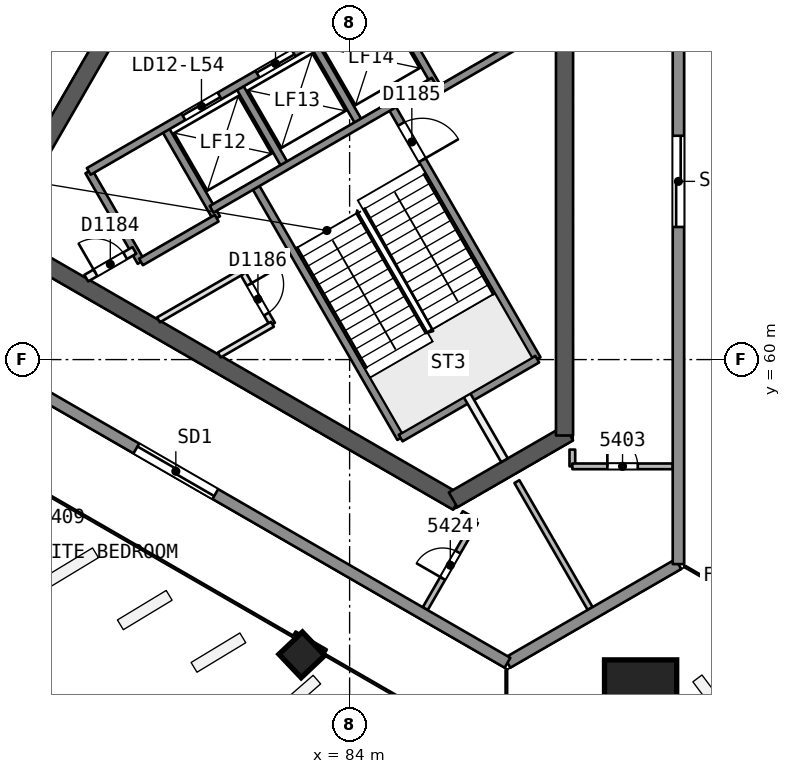
"""IFC4 building model, lengths in metres.
Left out: names, types, materials, properties, quantities, classifications, styles, units other than length and angle.
Written with IfcOpenShell. Run it as: python <this file> out.ifc"""

import sys

from ifc_helpers import new_model, si_unit, direction, frame, frame_2d, origin, origin_2d, place, context, subcontext, project, spatial, rectangle, extrude, element, fill, save


model = new_model("IFC4")
c1 = context("Model", 3, precision=1e-05, world=origin(), true_north=direction((0.0, 1.0)))
c2 = subcontext(c1, "Body", "Model", "MODEL_VIEW")
j1 = project(units=[si_unit("LENGTHUNIT", "METRE"), si_unit("PLANEANGLEUNIT", "RADIAN")], contexts=[c1])
p1 = place(None, origin())
s1 = spatial("IfcSite", under=j1, at=p1, CompositionType="ELEMENT")
p2 = place(p1, origin())
s2 = spatial("IfcBuilding", under=s1, at=p2, CompositionType="ELEMENT")
p3 = place(p2, frame((0.0, 0.0, 220.6)))
s3 = spatial("IfcBuildingStorey", under=s2, at=p3, CompositionType="ELEMENT", Elevation=220.6)
p4 = place(p3, frame((79.63, 71.981, 0.0), z_axis=(0.0, 0.0, 1.0), x_axis=(-0.500002171595, -0.86602415001, 0.0)))
e1 = element("IfcWall", 1, at=p4, inside=s3, PredefinedType="SHEAR", context=c2, shape_type="SweptSolid", body=[
    extrude(rectangle(XDim=10.25, YDim=0.45, at=frame_2d((5.125, 0.0))), origin(), (0.0, 0.0, 1.0), 3.7),
])
p5 = place(p4, frame((0.82, 0.0, 0.0)))
e2 = element("IfcOpeningElement", 2, at=p5, cuts=e1, PredefinedType="OPENING", context=c2, shape_type="SweptSolid", body=[
    extrude(rectangle(XDim=1.2, YDim=2.1, at=frame_2d((0.6, 1.05))), frame((0.0, 0.235, 0.0), z_axis=(0.0, -1.0, 0.0), x_axis=(1.0, 0.0, 0.0)), (0.0, 0.0, 1.0), 0.471),
])
p6 = place(p3, frame((74.617, 63.299, 0.0), z_axis=(0.0, 0.0, 1.0), x_axis=(0.86602594008, -0.499999071108, 0.0)))
e3 = element("IfcWall", 3, at=p6, inside=s3, PredefinedType="SHEAR", context=c2, shape_type="SweptSolid", body=[
    extrude(rectangle(XDim=14.108, YDim=0.45, at=frame_2d((7.054, 0.0))), origin(), (0.0, 0.0, 1.0), 3.7),
])
p7 = place(p3, frame((86.723, 56.31, 0.0), z_axis=(0.0, 0.0, 1.0), x_axis=(0.866042179588, 0.49997094233, 0.0)))
e4 = element("IfcWall", 4, at=p7, inside=s3, PredefinedType="SHEAR", context=c2, shape_type="SweptSolid", body=[
    extrude(rectangle(XDim=3.515, YDim=0.45, at=frame_2d((1.758, 0.0))), origin(), (0.0, 0.0, 1.0), 3.7),
])
p8 = place(p3, frame((89.655, 58.002, 0.0), z_axis=(0.0, 0.0, 1.0), x_axis=(0.0, 1.0, 0.0)))
e5 = element("IfcWall", 5, at=p8, inside=s3, PredefinedType="SHEAR", context=c2, shape_type="SweptSolid", body=[
    extrude(rectangle(XDim=14.204, YDim=0.45, at=frame_2d((7.102, 0.0))), origin(), (0.0, 0.0, 1.0), 3.7),
])
p9 = place(p3, frame((82.752, 52.197, 0.0), z_axis=(-0.00837646992, 0.028097450282, 0.999570091609), x_axis=(-0.499671890349, -0.865980240747, 0.02015501501)))
e6 = element("IfcColumn", 6, at=p9, inside=s3, PredefinedType="COLUMN", context=c2, shape_type="SweptSolid", body=[
    extrude(rectangle(XDim=0.85, YDim=0.85, at=origin_2d()), origin(), (0.0, 0.0, 1.0), 3.702),
])
p10 = place(p3, frame((91.678, 51.112, 0.0), z_axis=(-0.017607037296, 0.030466109479, 0.999380712447), x_axis=(-0.865809063816, -0.500374524745, 1.32655e-07)))
e7 = element("IfcColumn", 7, at=p10, inside=s3, PredefinedType="COLUMN", context=c2, shape_type="SweptSolid", body=[
    extrude(rectangle(XDim=1.9, YDim=1.9, at=origin_2d()), origin(), (0.0, 0.0, 1.0), 3.702),
])
p11 = place(p3, frame((89.861, 57.632, 0.0), z_axis=(0.0, 0.0, 1.0), x_axis=(0.0, -1.0, 0.0)))
e8 = element("IfcWall", 8, at=p11, inside=s3, PredefinedType="PARTITIONING", context=c2, shape_type="SweptSolid", body=[
    extrude(rectangle(XDim=0.441, YDim=0.15, at=frame_2d((0.22, 0.0))), origin(), (0.0, 0.0, 1.0), 3.3),
])
p12 = place(p3, frame((89.861, 57.191, 0.0), z_axis=(0.0, 0.0, 1.0), x_axis=(1.0, 0.0, 0.0)))
e9 = element("IfcWall", 9, at=p12, inside=s3, PredefinedType="PARTITIONING", context=c2, shape_type="SweptSolid", body=[
    extrude(rectangle(XDim=2.642, YDim=0.15, at=frame_2d((1.321, 0.0))), origin(), (0.0, 0.0, 1.0), 3.3),
])
p13 = place(p12, frame((0.921, 0.0, 0.0)))
e10 = element("IfcOpeningElement", 10, at=p13, cuts=e9, PredefinedType="OPENING", context=c2, shape_type="SweptSolid", body=[
    extrude(rectangle(XDim=0.8, YDim=2.1, at=frame_2d((0.4, 1.05))), frame((0.0, 0.085, 0.0), z_axis=(0.0, -1.0, 0.0), x_axis=(1.0, 0.0, 0.0)), (0.0, 0.0, 1.0), 0.171),
])
p14 = place(p3, frame((88.402, 56.789, 0.0), z_axis=(0.0, 0.0, 1.0), x_axis=(0.499980071345, -0.866036909293, 0.0)))
e11 = element("IfcWall", 11, at=p14, inside=s3, PredefinedType="PARTITIONING", context=c2, shape_type="SweptSolid", body=[
    extrude(rectangle(XDim=3.856, YDim=0.15, at=frame_2d((1.928, 0.0))), origin(), (0.0, 0.0, 1.0), 3.3),
])
p15 = place(p3, frame((85.989, 53.445, 0.0), z_axis=(0.0, 0.0, 1.0), x_axis=(0.50000507839, 0.866022471755, 0.0)))
e12 = element("IfcWall", 12, at=p15, inside=s3, PredefinedType="PARTITIONING", context=c2, shape_type="SweptSolid", body=[
    extrude(rectangle(XDim=2.642, YDim=0.15, at=frame_2d((1.321, 0.0))), origin(), (0.0, 0.0, 1.0), 3.3),
])
p16 = place(p15, frame((0.921, 0.0, 0.0)))
e13 = element("IfcOpeningElement", 13, at=p16, cuts=e12, PredefinedType="OPENING", context=c2, shape_type="SweptSolid", body=[
    extrude(rectangle(XDim=0.8, YDim=2.1, at=frame_2d((0.4, 1.05))), frame((0.0, 0.085, 0.0), z_axis=(0.0, -1.0, 0.0), x_axis=(1.0, 0.0, 0.0)), (0.0, 0.0, 1.0), 0.171),
])
p17 = place(p3, frame((87.31, 55.733, 0.0), z_axis=(0.0, 0.0, 1.0), x_axis=(-0.8659754619, 0.500086491905, 0.0)))
e14 = element("IfcWall", 14, at=p17, inside=s3, PredefinedType="PARTITIONING", context=c2, shape_type="SweptSolid", body=[
    extrude(rectangle(XDim=0.426, YDim=0.15, at=frame_2d((0.213, 0.0))), origin(), (0.0, 0.0, 1.0), 3.3),
])
p18 = place(p3, frame((92.652, 54.619, 0.0), z_axis=(0.0, 0.0, 1.0), x_axis=(-0.866044673852, -0.499966621779, 0.0)))
e15 = element("IfcWall", 15, at=p18, inside=s3, PredefinedType="SOLIDWALL", context=c2, shape_type="SweptSolid", body=[
    extrude(rectangle(XDim=5.193, YDim=0.3, at=frame_2d((2.597, 0.0))), origin(), (0.0, 0.0, 1.0), 3.3),
])
p19 = place(p3, frame((92.652, 105.381, 0.0), z_axis=(0.0, 0.0, 1.0), x_axis=(0.0, -1.0, 0.0)))
e16 = element("IfcWall", 16, at=p19, inside=s3, PredefinedType="SOLIDWALL", context=c2, shape_type="SweptSolid", body=[
    extrude(rectangle(XDim=50.762, YDim=0.3, at=frame_2d((25.381, 0.0))), origin(), (0.0, 0.0, 1.0), 3.3),
])
p20 = place(p19, frame((29.325, 0.0, 0.0)))
e17 = element("IfcOpeningElement", 17, at=p20, cuts=e16, PredefinedType="OPENING", context=c2, shape_type="SweptSolid", body=[
    extrude(rectangle(XDim=2.4, YDim=2.4, at=frame_2d((1.2, 1.2))), frame((0.0, 0.161, 0.0), z_axis=(0.0, -1.0, 0.0), x_axis=(1.0, 0.0, 0.0)), (0.0, 0.0, 1.0), 0.321),
])
p21 = place(p19, frame((39.492, 0.0, 0.0)))
e18 = element("IfcOpeningElement", 18, at=p21, cuts=e16, PredefinedType="OPENING", context=c2, shape_type="SweptSolid", body=[
    extrude(rectangle(XDim=2.4, YDim=2.4, at=frame_2d((1.2, 1.2))), frame((0.0, 0.161, 0.0), z_axis=(0.0, -1.0, 0.0), x_axis=(1.0, 0.0, 0.0)), (0.0, 0.0, 1.0), 0.321),
])
p22 = place(p19, frame((18.881, 0.0, 0.0)))
e19 = element("IfcOpeningElement", 19, at=p22, cuts=e16, PredefinedType="OPENING", context=c2, shape_type="SweptSolid", body=[
    extrude(rectangle(XDim=2.4, YDim=2.4, at=frame_2d((1.2, 1.2))), frame((0.0, 0.161, 0.0), z_axis=(0.0, -1.0, 0.0), x_axis=(1.0, 0.0, 0.0)), (0.0, 0.0, 1.0), 0.321),
])
p23 = place(p19, frame((8.878, 0.0, 0.0)))
e20 = element("IfcOpeningElement", 20, at=p23, cuts=e16, PredefinedType="OPENING", context=c2, shape_type="SweptSolid", body=[
    extrude(rectangle(XDim=2.4, YDim=2.4, at=frame_2d((1.2, 1.2))), frame((0.0, 0.161, 0.0), z_axis=(0.0, -1.0, 0.0), x_axis=(1.0, 0.0, 0.0)), (0.0, 0.0, 1.0), 0.321),
])
p24 = place(p19, frame((24.025, 0.0, 0.0)))
e21 = element("IfcOpeningElement", 21, at=p24, cuts=e16, PredefinedType="OPENING", context=c2, shape_type="SweptSolid", body=[
    extrude(rectangle(XDim=2.4, YDim=2.4, at=frame_2d((1.2, 1.2))), frame((0.0, 0.161, 0.0), z_axis=(0.0, -1.0, 0.0), x_axis=(1.0, 0.0, 0.0)), (0.0, 0.0, 1.0), 0.321),
])
p25 = place(p3, frame((88.155, 52.022, 0.0), z_axis=(0.0, 0.0, 1.0), x_axis=(-0.866024521231, 0.500001528624, 0.0)))
e22 = element("IfcWall", 22, at=p25, inside=s3, PredefinedType="SOLIDWALL", context=c2, shape_type="SweptSolid", body=[
    extrude(rectangle(XDim=50.762, YDim=0.3, at=frame_2d((25.381, 0.0))), origin(), (0.0, 0.0, 1.0), 3.3),
])
p26 = place(p25, frame((23.402, 0.0, 0.0)))
e23 = element("IfcOpeningElement", 23, at=p26, cuts=e22, PredefinedType="OPENING", context=c2, shape_type="SweptSolid", body=[
    extrude(rectangle(XDim=2.4, YDim=2.4, at=frame_2d((1.2, 1.2))), frame((0.0, 0.161, 0.0), z_axis=(0.0, -1.0, 0.0), x_axis=(1.0, 0.0, 0.0)), (0.0, 0.0, 1.0), 0.321),
])
p27 = place(p25, frame((29.013, 0.0, 0.0)))
e24 = element("IfcOpeningElement", 24, at=p27, cuts=e22, PredefinedType="OPENING", context=c2, shape_type="SweptSolid", body=[
    extrude(rectangle(XDim=2.4, YDim=2.4, at=frame_2d((1.2, 1.2))), frame((0.0, 0.161, 0.0), z_axis=(0.0, -1.0, 0.0), x_axis=(1.0, 0.0, 0.0)), (0.0, 0.0, 1.0), 0.321),
])
p28 = place(p25, frame((39.492, 0.0, 0.0)))
e25 = element("IfcOpeningElement", 25, at=p28, cuts=e22, PredefinedType="OPENING", context=c2, shape_type="SweptSolid", body=[
    extrude(rectangle(XDim=2.4, YDim=2.4, at=frame_2d((1.2, 1.2))), frame((0.0, 0.161, 0.0), z_axis=(0.0, -1.0, 0.0), x_axis=(1.0, 0.0, 0.0)), (0.0, 0.0, 1.0), 0.321),
])
p29 = place(p25, frame((18.569, 0.0, 0.0)))
e26 = element("IfcOpeningElement", 26, at=p29, cuts=e22, PredefinedType="OPENING", context=c2, shape_type="SweptSolid", body=[
    extrude(rectangle(XDim=2.4, YDim=2.4, at=frame_2d((1.2, 1.2))), frame((0.0, 0.161, 0.0), z_axis=(0.0, -1.0, 0.0), x_axis=(1.0, 0.0, 0.0)), (0.0, 0.0, 1.0), 0.321),
])
p30 = place(p25, frame((8.878, 0.0, 0.0)))
e27 = element("IfcOpeningElement", 27, at=p30, cuts=e22, PredefinedType="OPENING", context=c2, shape_type="SweptSolid", body=[
    extrude(rectangle(XDim=2.4, YDim=2.4, at=frame_2d((1.2, 1.2))), frame((0.0, 0.161, 0.0), z_axis=(0.0, -1.0, 0.0), x_axis=(1.0, 0.0, 0.0)), (0.0, 0.0, 1.0), 0.321),
])
p31 = place(p3, frame((77.135, 64.952, 0.0), z_axis=(0.0, 0.0, 1.0), x_axis=(0.499996545922, -0.866027397988, 0.0)))
e28 = element("IfcWall", 28, at=p31, inside=s3, PredefinedType="SOLIDWALL", context=c2, shape_type="SweptSolid", body=[
    extrude(rectangle(XDim=2.75, YDim=0.2, at=frame_2d((1.375, 0.0))), origin(), (0.0, 0.0, 1.0), 3.3),
])
p32 = place(p3, frame((81.169, 62.315, 0.0), z_axis=(0.0, 0.0, 1.0), x_axis=(0.499995408039, -0.866028054938, 0.0)))
e29 = element("IfcWall", 29, at=p32, inside=s3, PredefinedType="PARTITIONING", context=c2, shape_type="SweptSolid", body=[
    extrude(rectangle(XDim=1.6, YDim=0.15, at=frame_2d((0.8, 0.0))), origin(), (0.0, 0.0, 1.0), 3.3),
])
p33 = place(p32, frame((0.387, 0.0, 0.0)))
e30 = element("IfcOpeningElement", 30, at=p33, cuts=e29, PredefinedType="OPENING", context=c2, shape_type="SweptSolid", body=[
    extrude(rectangle(XDim=0.9, YDim=2.1, at=frame_2d((0.45, 1.05))), frame((0.0, 0.085, 0.0), z_axis=(0.0, -1.0, 0.0), x_axis=(1.0, 0.0, 0.0)), (0.0, 0.0, 1.0), 0.171),
])
p34 = place(p3, frame((79.127, 66.102, 0.0), z_axis=(0.0, 0.0, 1.0), x_axis=(0.499996545922, -0.866027397988, 0.0)))
e31 = element("IfcWall", 31, at=p34, inside=s3, PredefinedType="SOLIDWALL", context=c2, shape_type="SweptSolid", body=[
    extrude(rectangle(XDim=2.75, YDim=0.2, at=frame_2d((1.375, 0.0))), origin(), (0.0, 0.0, 1.0), 3.3),
])
p35 = place(p3, frame((81.493, 64.604, 0.0), z_axis=(0.0, 0.0, 1.0), x_axis=(0.500006057782, -0.866021906294, 0.0)))
e32 = element("IfcWall", 32, at=p35, inside=s3, PredefinedType="SOLIDWALL", context=c2, shape_type="SweptSolid", body=[
    extrude(rectangle(XDim=7.7, YDim=0.2, at=frame_2d((3.85, 0.0))), origin(), (0.0, 0.0, 1.0), 3.3),
])
p36 = place(p3, frame((81.076, 67.227, 0.0), z_axis=(0.0, 0.0, 1.0), x_axis=(0.50000366821, -0.866023285932, 0.0)))
e33 = element("IfcWall", 33, at=p36, inside=s3, PredefinedType="SOLIDWALL", context=c2, shape_type="SweptSolid", body=[
    extrude(rectangle(XDim=2.48, YDim=0.2, at=frame_2d((1.24, 0.0))), origin(), (0.0, 0.0, 1.0), 3.3),
])
p37 = place(p3, frame((87.09, 59.06, 0.0), z_axis=(0.0, 0.0, 1.0), x_axis=(0.500011643316, -0.866018681408, 0.0)))
e34 = element("IfcWall", 34, at=p37, inside=s3, PredefinedType="PARTITIONING", context=c2, shape_type="SweptSolid", body=[
    extrude(rectangle(XDim=1.973, YDim=0.2, at=frame_2d((0.987, 0.0))), origin(), (0.0, 0.0, 1.0), 3.3),
])
p38 = place(p3, frame((83.024, 68.352, 0.0), z_axis=(0.0, 0.0, 1.0), x_axis=(0.50000366821, -0.866023285932, 0.0)))
e35 = element("IfcWall", 35, at=p38, inside=s3, PredefinedType="SOLIDWALL", context=c2, shape_type="SweptSolid", body=[
    extrude(rectangle(XDim=2.48, YDim=0.2, at=frame_2d((1.24, 0.0))), origin(), (0.0, 0.0, 1.0), 3.3),
])
p39 = place(p3, frame((85.087, 66.679, 0.0), z_axis=(0.0, 0.0, 1.0), x_axis=(0.500019787375, -0.866013979237, 0.0)))
e36 = element("IfcWall", 36, at=p39, inside=s3, PredefinedType="SOLIDWALL", context=c2, shape_type="SweptSolid", body=[
    extrude(rectangle(XDim=7.7, YDim=0.2, at=frame_2d((3.85, 0.0))), origin(), (0.0, 0.0, 1.0), 3.3),
])
p40 = place(p39, frame((0.55, 0.0, 0.0)))
e37 = element("IfcOpeningElement", 37, at=p40, cuts=e36, PredefinedType="OPENING", context=c2, shape_type="SweptSolid", body=[
    extrude(rectangle(XDim=1.1, YDim=2.1, at=frame_2d((0.55, 1.05))), frame((0.0, 0.11, 0.0), z_axis=(0.0, -1.0, 0.0), x_axis=(1.0, 0.0, 0.0)), (0.0, 0.0, 1.0), 0.221),
])
p41 = place(p3, frame((84.973, 69.477, 0.0), z_axis=(0.0, 0.0, 1.0), x_axis=(0.499996545922, -0.866027397988, 0.0)))
e38 = element("IfcWall", 38, at=p41, inside=s3, PredefinedType="SOLIDWALL", context=c2, shape_type="SweptSolid", body=[
    extrude(rectangle(XDim=2.75, YDim=0.2, at=frame_2d((1.375, 0.0))), origin(), (0.0, 0.0, 1.0), 3.3),
])
p42 = place(p3, frame((77.135, 64.952, 0.0), z_axis=(0.0, 0.0, 1.0), x_axis=(0.866031916153, 0.499988720078, 0.0)))
e39 = element("IfcWall", 39, at=p42, inside=s3, PredefinedType="SOLIDWALL", context=c2, shape_type="SweptSolid", body=[
    extrude(rectangle(XDim=11.35, YDim=0.2, at=frame_2d((5.675, 0.0))), origin(), (0.0, 0.0, 1.0), 3.3),
])
p43 = place(p42, frame((2.875, 0.0, 0.0)))
e40 = element("IfcOpeningElement", 40, at=p43, cuts=e39, PredefinedType="OPENING", context=c2, shape_type="SweptSolid", body=[
    extrude(rectangle(XDim=1.1, YDim=2.1, at=frame_2d((0.55, 1.05))), frame((0.0, 0.11, 0.0), z_axis=(0.0, -1.0, 0.0), x_axis=(1.0, 0.0, 0.0)), (0.0, 0.0, 1.0), 0.221),
])
p44 = place(p42, frame((5.125, 0.0, 0.0)))
e41 = element("IfcOpeningElement", 41, at=p44, cuts=e39, PredefinedType="OPENING", context=c2, shape_type="SweptSolid", body=[
    extrude(rectangle(XDim=1.1, YDim=2.1, at=frame_2d((0.55, 1.05))), frame((0.0, 0.11, 0.0), z_axis=(0.0, -1.0, 0.0), x_axis=(1.0, 0.0, 0.0)), (0.0, 0.0, 1.0), 0.221),
])
p45 = place(p42, frame((7.375, 0.0, 0.0)))
e42 = element("IfcOpeningElement", 42, at=p45, cuts=e39, PredefinedType="OPENING", context=c2, shape_type="SweptSolid", body=[
    extrude(rectangle(XDim=1.1, YDim=2.1, at=frame_2d((0.55, 1.05))), frame((0.0, 0.11, 0.0), z_axis=(0.0, -1.0, 0.0), x_axis=(1.0, 0.0, 0.0)), (0.0, 0.0, 1.0), 0.221),
])
p46 = place(p3, frame((77.07, 62.143, 0.0), z_axis=(0.0, 0.0, 1.0), x_axis=(0.866013036001, 0.500021421018, 0.0)))
e43 = element("IfcWall", 43, at=p46, inside=s3, PredefinedType="PARTITIONING", context=c2, shape_type="SweptSolid", body=[
    extrude(rectangle(XDim=1.461, YDim=0.2, at=frame_2d((0.73, 0.0))), origin(), (0.0, 0.0, 1.0), 3.3),
])
p47 = place(p46, frame((0.281, 0.0, 0.0)))
e44 = element("IfcOpeningElement", 44, at=p47, cuts=e43, PredefinedType="OPENING", context=c2, shape_type="SweptSolid", body=[
    extrude(rectangle(XDim=0.9, YDim=2.1, at=frame_2d((0.45, 1.05))), frame((0.0, 0.11, 0.0), z_axis=(0.0, -1.0, 0.0), x_axis=(1.0, 0.0, 0.0)), (0.0, 0.0, 1.0), 0.221),
])
p48 = place(p3, frame((80.367, 63.954, 0.0), z_axis=(0.0, 0.0, 1.0), x_axis=(0.866026575979, 0.499997969693, 0.0)))
e45 = element("IfcWall", 45, at=p48, inside=s3, PredefinedType="SOLIDWALL", context=c2, shape_type="SweptSolid", body=[
    extrude(rectangle(XDim=6.75, YDim=0.2, at=frame_2d((3.375, 0.0))), origin(), (0.0, 0.0, 1.0), 3.3),
])
p49 = place(p3, frame((78.51, 62.57, 0.0), z_axis=(0.0, 0.0, 1.0), x_axis=(0.866053019151, 0.499952165731, 0.0)))
e46 = element("IfcWall", 46, at=p49, inside=s3, PredefinedType="SOLIDWALL", context=c2, shape_type="SweptSolid", body=[
    extrude(rectangle(XDim=2.3, YDim=0.2, at=frame_2d((1.15, 0.0))), origin(), (0.0, 0.0, 1.0), 3.3),
])
p50 = place(p3, frame((86.348, 67.095, 0.0), z_axis=(0.0, 0.0, 1.0), x_axis=(0.86602648383, 0.499998129301, 0.0)))
e47 = element("IfcWall", 47, at=p50, inside=s3, PredefinedType="SOLIDWALL", context=c2, shape_type="SweptSolid", body=[
    extrude(rectangle(XDim=2.3, YDim=0.2, at=frame_2d((1.15, 0.0))), origin(), (0.0, 0.0, 1.0), 3.3),
])
p51 = place(p3, frame((78.97, 61.046, 0.0), z_axis=(0.0, 0.0, 1.0), x_axis=(0.866033475577, 0.499986018985, 0.0)))
e48 = element("IfcWall", 48, at=p51, inside=s3, PredefinedType="PARTITIONING", context=c2, shape_type="SweptSolid", body=[
    extrude(rectangle(XDim=2.539, YDim=0.15, at=frame_2d((1.27, 0.0))), origin(), (0.0, 0.0, 1.0), 3.3),
])
p52 = place(p3, frame((80.57, 60.122, 0.0), z_axis=(0.0, 0.0, 1.0), x_axis=(0.866039608017, 0.49997539674, 0.0)))
e49 = element("IfcWall", 49, at=p52, inside=s3, PredefinedType="PARTITIONING", context=c2, shape_type="SweptSolid", body=[
    extrude(rectangle(XDim=1.615, YDim=0.15, at=frame_2d((0.808, 0.0))), origin(), (0.0, 0.0, 1.0), 3.3),
])
p53 = place(p3, frame((85.343, 57.935, 0.0), z_axis=(0.0, 0.0, 1.0), x_axis=(0.866004344652, 0.500036473714, 0.0)))
e50 = element("IfcWall", 50, at=p53, inside=s3, PredefinedType="SOLIDWALL", context=c2, shape_type="SweptSolid", body=[
    extrude(rectangle(XDim=4.15, YDim=0.2, at=frame_2d((2.075, 0.0))), origin(), (0.0, 0.0, 1.0), 3.3),
])
p54 = place(p13, origin())
e51 = element("IfcDoor", 51, at=p54, inside=s3, OperationType="SINGLE_SWING_LEFT", PredefinedType="NOTDEFINED", context=c2, shape_type="SweptSolid", body=[
    extrude(rectangle(XDim=0.8, YDim=2.1, at=frame_2d((0.4, 1.05))), frame((0.0, 0.025, 0.0), z_axis=(0.0, -1.0, 0.0), x_axis=(1.0, 0.0, 0.0)), (0.0, 0.0, 1.0), 0.05),
])
fill(e10, e51)
p55 = place(p16, origin())
e52 = element("IfcDoor", 52, at=p55, inside=s3, OperationType="SINGLE_SWING_LEFT", PredefinedType="NOTDEFINED", context=c2, shape_type="SweptSolid", body=[
    extrude(rectangle(XDim=0.8, YDim=2.1, at=frame_2d((0.4, 1.05))), frame((0.0, 0.025, 0.0), z_axis=(0.0, -1.0, 0.0), x_axis=(1.0, 0.0, 0.0)), (0.0, 0.0, 1.0), 0.05),
])
fill(e13, e52)
p56 = place(p21, origin())
e53 = element("IfcDoor", 53, at=p56, inside=s3, OperationType="SLIDING_TO_RIGHT", PredefinedType="NOTDEFINED", context=c2, shape_type="SweptSolid", body=[
    extrude(rectangle(XDim=2.4, YDim=2.4, at=frame_2d((1.2, 1.2))), frame((0.0, 0.025, 0.0), z_axis=(0.0, -1.0, 0.0), x_axis=(1.0, 0.0, 0.0)), (0.0, 0.0, 1.0), 0.05),
])
fill(e18, e53)
p57 = place(p30, origin())
e54 = element("IfcDoor", 54, at=p57, inside=s3, OperationType="SLIDING_TO_LEFT", PredefinedType="NOTDEFINED", context=c2, shape_type="SweptSolid", body=[
    extrude(rectangle(XDim=2.4, YDim=2.4, at=frame_2d((1.2, 1.2))), frame((0.0, 0.025, 0.0), z_axis=(0.0, -1.0, 0.0), x_axis=(1.0, 0.0, 0.0)), (0.0, 0.0, 1.0), 0.05),
])
fill(e27, e54)
p58 = place(p43, origin())
e55 = element("IfcDoor", 55, at=p58, inside=s3, OperationType="SLIDING_TO_LEFT", PredefinedType="NOTDEFINED", context=c2, shape_type="SweptSolid", body=[
    extrude(rectangle(XDim=1.1, YDim=2.1, at=frame_2d((0.55, 1.05))), frame((0.0, 0.025, 0.0), z_axis=(0.0, -1.0, 0.0), x_axis=(1.0, 0.0, 0.0)), (0.0, 0.0, 1.0), 0.05),
])
fill(e40, e55)
p59 = place(p44, origin())
e56 = element("IfcDoor", 56, at=p59, inside=s3, OperationType="SLIDING_TO_RIGHT", PredefinedType="NOTDEFINED", context=c2, shape_type="SweptSolid", body=[
    extrude(rectangle(XDim=1.1, YDim=2.1, at=frame_2d((0.55, 1.05))), frame((0.0, 0.025, 0.0), z_axis=(0.0, -1.0, 0.0), x_axis=(1.0, 0.0, 0.0)), (0.0, 0.0, 1.0), 0.05),
])
fill(e41, e56)
p60 = place(p47, origin())
e57 = element("IfcDoor", 57, at=p60, inside=s3, OperationType="SINGLE_SWING_LEFT", PredefinedType="NOTDEFINED", context=c2, shape_type="SweptSolid", body=[
    extrude(rectangle(XDim=0.9, YDim=2.1, at=frame_2d((0.45, 1.05))), frame((0.0, 0.025, 0.0), z_axis=(0.0, -1.0, 0.0), x_axis=(1.0, 0.0, 0.0)), (0.0, 0.0, 1.0), 0.05),
])
fill(e44, e57)
p61 = place(p40, origin())
e58 = element("IfcDoor", 58, at=p61, inside=s3, OperationType="SINGLE_SWING_RIGHT", PredefinedType="NOTDEFINED", context=c2, shape_type="SweptSolid", body=[
    extrude(rectangle(XDim=1.1, YDim=2.1, at=frame_2d((0.55, 1.05))), frame((0.0, 0.025, 0.0), z_axis=(0.0, -1.0, 0.0), x_axis=(1.0, 0.0, 0.0)), (0.0, 0.0, 1.0), 0.05),
])
fill(e37, e58)
p62 = place(p33, origin())
e59 = element("IfcDoor", 59, at=p62, inside=s3, OperationType="SINGLE_SWING_LEFT", PredefinedType="NOTDEFINED", context=c2, shape_type="SweptSolid", body=[
    extrude(rectangle(XDim=0.9, YDim=2.1, at=frame_2d((0.45, 1.05))), frame((0.0, 0.025, 0.0), z_axis=(0.0, -1.0, 0.0), x_axis=(1.0, 0.0, 0.0)), (0.0, 0.0, 1.0), 0.05),
])
fill(e30, e59)
save(model, sys.argv[1])
